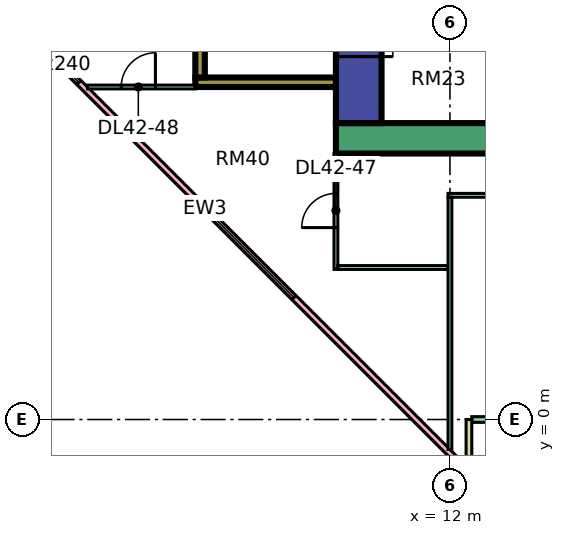
"""IFC4 building model, lengths in metres.
Left out: names, types, materials, properties, quantities, classifications, styles, units other than length and angle.
Written with IfcOpenShell. Run it as: python <this file> out.ifc"""

import sys

from ifc_helpers import new_model, si_unit, direction, frame, frame_2d, origin, place, context, subcontext, project, spatial, rectangle, extrude, element, fill, save


model = new_model("IFC4")
c1 = context("Model", 3, precision=1e-05, world=origin(), true_north=direction((0.0, 1.0)))
c2 = subcontext(c1, "Body", "Model", "MODEL_VIEW")
j1 = project(units=[si_unit("LENGTHUNIT", "METRE"), si_unit("PLANEANGLEUNIT", "RADIAN")], contexts=[c1])
p1 = place(None, origin())
s1 = spatial("IfcSite", under=j1, at=p1, CompositionType="ELEMENT")
p2 = place(p1, origin())
s2 = spatial("IfcBuilding", under=s1, at=p2, CompositionType="ELEMENT")
p3 = place(p2, frame((0.0, 0.0, 183.65)))
s3 = spatial("IfcBuildingStorey", under=s2, at=p3, CompositionType="ELEMENT", Elevation=183.65)
p4 = place(p3, frame((9.0, 7.4, 0.0), z_axis=(0.0, 0.0, 1.0), x_axis=(1.0, 0.0, 0.0)))
e1 = element("IfcWall", 1, at=p4, inside=s3, PredefinedType="SHEAR", context=c2, shape_type="SweptSolid", body=[
    extrude(rectangle(XDim=25.0, YDim=0.8, at=frame_2d((12.5, 0.0))), origin(), (0.0, 0.0, 1.0), 3.75),
])
p5 = place(p3, frame((9.6, 7.8, 0.0), z_axis=(0.0, 0.0, 1.0), x_axis=(0.0, 1.0, 0.0)))
e2 = element("IfcWall", 2, at=p5, inside=s3, PredefinedType="SHEAR", context=c2, shape_type="SweptSolid", body=[
    extrude(rectangle(XDim=11.4, YDim=1.2, at=frame_2d((5.7, 0.0))), origin(), (0.0, 0.0, 1.0), 3.75),
])
p6 = place(p5, frame((4.075, 0.0, 0.0)))
e3 = element("IfcOpeningElement", 3, at=p6, cuts=e2, PredefinedType="OPENING", context=c2, shape_type="SweptSolid", body=[
    extrude(rectangle(XDim=1.1, YDim=2.2, at=frame_2d((0.55, 1.1))), frame((0.0, 0.61, 0.0), z_axis=(0.0, -1.0, 0.0), x_axis=(1.0, 0.0, 0.0)), (0.0, 0.0, 1.0), 1.22),
])
p7 = place(p5, frame((6.575, 0.0, 0.0)))
e4 = element("IfcOpeningElement", 4, at=p7, cuts=e2, PredefinedType="OPENING", context=c2, shape_type="SweptSolid", body=[
    extrude(rectangle(XDim=1.1, YDim=2.2, at=frame_2d((0.55, 1.1))), frame((0.0, 0.61, 0.0), z_axis=(0.0, -1.0, 0.0), x_axis=(1.0, 0.0, 0.0)), (0.0, 0.0, 1.0), 1.22),
])
p8 = place(p5, frame((9.4, 0.0, 0.0)))
e5 = element("IfcOpeningElement", 5, at=p8, cuts=e2, PredefinedType="OPENING", context=c2, shape_type="SweptSolid", body=[
    extrude(rectangle(XDim=1.1, YDim=2.2, at=frame_2d((0.55, 1.1))), frame((0.0, 0.61, 0.0), z_axis=(0.0, -1.0, 0.0), x_axis=(1.0, 0.0, 0.0)), (0.0, 0.0, 1.0), 1.22),
])
p9 = place(p5, frame((1.75, 0.0, 0.0)))
e6 = element("IfcOpeningElement", 6, at=p9, cuts=e2, PredefinedType="OPENING", context=c2, shape_type="SweptSolid", body=[
    extrude(rectangle(XDim=0.9, YDim=2.1, at=frame_2d((0.45, 1.05))), frame((0.0, 0.61, 0.0), z_axis=(0.0, -1.0, 0.0), x_axis=(1.0, 0.0, 0.0)), (0.0, 0.0, 1.0), 1.22),
])
p10 = place(p3, frame((5.3, 8.875, 0.0), z_axis=(0.0, 0.0, 1.0), x_axis=(1.0, 0.0, 0.0)))
e7 = element("IfcWall", 7, at=p10, inside=s3, PredefinedType="SHEAR", context=c2, shape_type="SweptSolid", body=[
    extrude(rectangle(XDim=3.7, YDim=0.25, at=frame_2d((1.85, 0.0))), origin(), (0.0, 0.0, 1.0), 3.75),
])
p11 = place(p3, frame((5.425, 9.0, 0.0), z_axis=(0.0, 0.0, 1.0), x_axis=(0.0, 1.0, 0.0)))
e8 = element("IfcWall", 8, at=p11, inside=s3, PredefinedType="SHEAR", context=c2, shape_type="SweptSolid", body=[
    extrude(rectangle(XDim=4.0, YDim=0.25, at=frame_2d((2.0, 0.0))), origin(), (0.0, 0.0, 1.0), 3.75),
])
p12 = place(p3, frame((-1.447, 12.553, 0.0), z_axis=(0.0, 0.0, 1.0), x_axis=(0.707106781187, -0.707106781187, 0.0)))
e9 = element("IfcWall", 9, at=p12, inside=s3, PredefinedType="SOLIDWALL", context=c2, shape_type="SweptSolid", body=[
    extrude(rectangle(XDim=19.799, YDim=0.15, at=frame_2d((9.899, 0.0))), origin(), (0.0, 0.0, 1.0), 3.35),
])
p13 = place(p12, frame((2.212, 0.0, 0.45)))
e10 = element("IfcOpeningElement", 10, at=p13, cuts=e9, PredefinedType="OPENING", context=c2, shape_type="SweptSolid", body=[
    extrude(rectangle(XDim=3.0, YDim=2.4, at=frame_2d((1.5, 1.2))), frame((0.0, 0.085, 0.0), z_axis=(0.0, -1.0, 0.0), x_axis=(1.0, 0.0, 0.0)), (0.0, 0.0, 1.0), 0.17),
])
p14 = place(p12, frame((10.216, 0.0, 0.45)))
e11 = element("IfcOpeningElement", 11, at=p14, cuts=e9, PredefinedType="OPENING", context=c2, shape_type="SweptSolid", body=[
    extrude(rectangle(XDim=3.0, YDim=2.4, at=frame_2d((1.5, 1.2))), frame((0.0, 0.085, 0.0), z_axis=(0.0, -1.0, 0.0), x_axis=(1.0, 0.0, 0.0)), (0.0, 0.0, 1.0), 0.17),
])
p15 = place(p3, frame((12.575, 0.0, 0.0), z_axis=(0.0, 0.0, 1.0), x_axis=(1.0, 0.0, 0.0)))
e12 = element("IfcWall", 12, at=p15, inside=s3, PredefinedType="SOLIDWALL", context=c2, shape_type="SweptSolid", body=[
    extrude(rectangle(XDim=11.35, YDim=0.15, at=frame_2d((5.675, 0.0))), origin(), (0.0, 0.0, 1.0), 3.35),
])
p16 = place(p15, frame((3.312, 0.0, 0.0)))
e13 = element("IfcOpeningElement", 13, at=p16, cuts=e12, PredefinedType="OPENING", context=c2, shape_type="SweptSolid", body=[
    extrude(rectangle(XDim=1.8, YDim=2.4, at=frame_2d((0.9, 1.2))), frame((0.0, 0.085, 0.0), z_axis=(0.0, -1.0, 0.0), x_axis=(1.0, 0.0, 0.0)), (0.0, 0.0, 1.0), 0.17),
])
p17 = place(p15, frame((9.05, 0.0, 0.45)))
e14 = element("IfcOpeningElement", 14, at=p17, cuts=e12, PredefinedType="OPENING", context=c2, shape_type="SweptSolid", body=[
    extrude(rectangle(XDim=1.2, YDim=2.4, at=frame_2d((0.6, 1.2))), frame((0.0, 0.085, 0.0), z_axis=(0.0, -1.0, 0.0), x_axis=(1.0, 0.0, 0.0)), (0.0, 0.0, 1.0), 0.17),
])
p18 = place(p3, frame((12.5, -1.5, 0.0), z_axis=(0.0, 0.0, 1.0), x_axis=(0.0, 1.0, 0.0)))
e15 = element("IfcWall", 15, at=p18, inside=s3, PredefinedType="SOLIDWALL", context=c2, shape_type="SweptSolid", body=[
    extrude(rectangle(XDim=1.5, YDim=0.15, at=frame_2d((0.75, 0.0))), origin(), (0.0, 0.0, 1.0), 3.35),
])
p19 = place(p3, frame((2.461, 8.75, 0.0), z_axis=(0.0, 0.0, 1.0), x_axis=(1.0, 0.0, 0.0)))
e16 = element("IfcWall", 16, at=p19, inside=s3, PredefinedType="PARTITIONING", context=c2, shape_type="SweptSolid", body=[
    extrude(rectangle(XDim=2.839, YDim=0.1, at=frame_2d((1.419, 0.0))), origin(), (0.0, 0.0, 1.0), 3.35),
])
p20 = place(p19, frame((0.889, 0.0, 0.0)))
e17 = element("IfcOpeningElement", 17, at=p20, cuts=e16, PredefinedType="OPENING", context=c2, shape_type="SweptSolid", body=[
    extrude(rectangle(XDim=0.9, YDim=2.1, at=frame_2d((0.45, 1.05))), frame((0.0, 0.06, 0.0), z_axis=(0.0, -1.0, 0.0), x_axis=(1.0, 0.0, 0.0)), (0.0, 0.0, 1.0), 0.12),
])
p21 = place(p3, frame((9.0, 3.95, 0.0), z_axis=(0.0, 0.0, 1.0), x_axis=(0.0, 1.0, 0.0)))
e18 = element("IfcWall", 18, at=p21, inside=s3, PredefinedType="PARTITIONING", context=c2, shape_type="SweptSolid", body=[
    extrude(rectangle(XDim=3.05, YDim=0.1, at=frame_2d((1.525, 0.0))), origin(), (0.0, 0.0, 1.0), 3.35),
])
p22 = place(p21, frame((1.1, 0.0, 0.0)))
e19 = element("IfcOpeningElement", 19, at=p22, cuts=e18, PredefinedType="OPENING", context=c2, shape_type="SweptSolid", body=[
    extrude(rectangle(XDim=0.9, YDim=2.1, at=frame_2d((0.45, 1.05))), frame((0.0, 0.06, 0.0), z_axis=(0.0, -1.0, 0.0), x_axis=(1.0, 0.0, 0.0)), (0.0, 0.0, 1.0), 0.12),
])
p23 = place(p3, frame((9.05, 4.0, 0.0), z_axis=(0.0, 0.0, 1.0), x_axis=(1.0, 0.0, 0.0)))
e20 = element("IfcWall", 20, at=p23, inside=s3, PredefinedType="PARTITIONING", context=c2, shape_type="SweptSolid", body=[
    extrude(rectangle(XDim=2.9, YDim=0.1, at=frame_2d((1.45, 0.0))), origin(), (0.0, 0.0, 1.0), 3.35),
])
p24 = place(p3, frame((11.95, 5.9, 0.0), z_axis=(0.0, 0.0, 1.0), x_axis=(1.0, 0.0, 0.0)))
e21 = element("IfcWall", 21, at=p24, inside=s3, PredefinedType="PARTITIONING", context=c2, shape_type="SweptSolid", body=[
    extrude(rectangle(XDim=21.1, YDim=0.1, at=frame_2d((10.55, 0.0))), origin(), (0.0, 0.0, 1.0), 3.35),
])
p25 = place(p24, frame((10.1, 0.0, 0.0)))
e22 = element("IfcOpeningElement", 22, at=p25, cuts=e21, PredefinedType="OPENING", context=c2, shape_type="SweptSolid", body=[
    extrude(rectangle(XDim=0.9, YDim=2.1, at=frame_2d((0.45, 1.05))), frame((0.0, 0.06, 0.0), z_axis=(0.0, -1.0, 0.0), x_axis=(1.0, 0.0, 0.0)), (0.0, 0.0, 1.0), 0.12),
])
p26 = place(p24, frame((13.1, 0.0, 0.0)))
e23 = element("IfcOpeningElement", 23, at=p26, cuts=e21, PredefinedType="OPENING", context=c2, shape_type="SweptSolid", body=[
    extrude(rectangle(XDim=0.9, YDim=2.1, at=frame_2d((0.45, 1.05))), frame((0.0, 0.06, 0.0), z_axis=(0.0, -1.0, 0.0), x_axis=(1.0, 0.0, 0.0)), (0.0, 0.0, 1.0), 0.12),
])
p27 = place(p24, frame((16.1, 0.0, 0.0)))
e24 = element("IfcOpeningElement", 24, at=p27, cuts=e21, PredefinedType="OPENING", context=c2, shape_type="SweptSolid", body=[
    extrude(rectangle(XDim=0.9, YDim=2.1, at=frame_2d((0.45, 1.05))), frame((0.0, 0.06, 0.0), z_axis=(0.0, -1.0, 0.0), x_axis=(1.0, 0.0, 0.0)), (0.0, 0.0, 1.0), 0.12),
])
p28 = place(p24, frame((4.1, 0.0, 0.0)))
e25 = element("IfcOpeningElement", 25, at=p28, cuts=e21, PredefinedType="OPENING", context=c2, shape_type="SweptSolid", body=[
    extrude(rectangle(XDim=0.9, YDim=2.1, at=frame_2d((0.45, 1.05))), frame((0.0, 0.06, 0.0), z_axis=(0.0, -1.0, 0.0), x_axis=(1.0, 0.0, 0.0)), (0.0, 0.0, 1.0), 0.12),
])
p29 = place(p3, frame((12.0, -0.788, 0.0), z_axis=(0.0, 0.0, 1.0), x_axis=(0.0, 1.0, 0.0)))
e26 = element("IfcWall", 26, at=p29, inside=s3, PredefinedType="PARTITIONING", context=c2, shape_type="SweptSolid", body=[
    extrude(rectangle(XDim=6.638, YDim=0.1, at=frame_2d((3.319, 0.0))), origin(), (0.0, 0.0, 1.0), 3.35),
])
p30 = place(p13, origin())
e27 = element("IfcWindow", 27, at=p30, inside=s3, PartitioningType="SINGLE_PANEL", PredefinedType="WINDOW", context=c2, shape_type="SweptSolid", body=[
    extrude(rectangle(XDim=3.0, YDim=2.4, at=frame_2d((1.5, 1.2))), frame((0.0, 0.03, 0.0), z_axis=(0.0, -1.0, 0.0), x_axis=(1.0, 0.0, 0.0)), (0.0, 0.0, 1.0), 0.06),
])
fill(e10, e27)
p31 = place(p14, origin())
e28 = element("IfcWindow", 28, at=p31, inside=s3, PartitioningType="SINGLE_PANEL", PredefinedType="WINDOW", context=c2, shape_type="SweptSolid", body=[
    extrude(rectangle(XDim=3.0, YDim=2.4, at=frame_2d((1.5, 1.2))), frame((0.0, 0.03, 0.0), z_axis=(0.0, -1.0, 0.0), x_axis=(1.0, 0.0, 0.0)), (0.0, 0.0, 1.0), 0.06),
])
fill(e11, e28)
p32 = place(p9, frame((0.9, 0.0, 0.0), z_axis=(0.0, 0.0, 1.0), x_axis=(-1.0, 0.0, 0.0)))
e29 = element("IfcDoor", 29, at=p32, inside=s3, OperationType="SINGLE_SWING_LEFT", PredefinedType="DOOR", context=c2, shape_type="SweptSolid", body=[
    extrude(rectangle(XDim=0.9, YDim=2.1, at=frame_2d((0.45, 1.05))), frame((0.0, 0.025, 0.0), z_axis=(0.0, -1.0, 0.0), x_axis=(1.0, 0.0, 0.0)), (0.0, 0.0, 1.0), 0.05),
])
fill(e6, e29)
p33 = place(p22, origin())
e30 = element("IfcDoor", 30, at=p33, inside=s3, OperationType="SINGLE_SWING_LEFT", PredefinedType="DOOR", context=c2, shape_type="SweptSolid", body=[
    extrude(rectangle(XDim=0.9, YDim=2.1, at=frame_2d((0.45, 1.05))), frame((0.0, 0.025, 0.0), z_axis=(0.0, -1.0, 0.0), x_axis=(1.0, 0.0, 0.0)), (0.0, 0.0, 1.0), 0.05),
])
fill(e19, e30)
p34 = place(p20, frame((0.9, 0.0, 0.0), z_axis=(0.0, 0.0, 1.0), x_axis=(-1.0, 0.0, 0.0)))
e31 = element("IfcDoor", 31, at=p34, inside=s3, OperationType="SINGLE_SWING_RIGHT", PredefinedType="DOOR", context=c2, shape_type="SweptSolid", body=[
    extrude(rectangle(XDim=0.9, YDim=2.1, at=frame_2d((0.45, 1.05))), frame((0.0, 0.025, 0.0), z_axis=(0.0, -1.0, 0.0), x_axis=(1.0, 0.0, 0.0)), (0.0, 0.0, 1.0), 0.05),
])
fill(e17, e31)
save(model, sys.argv[1])
